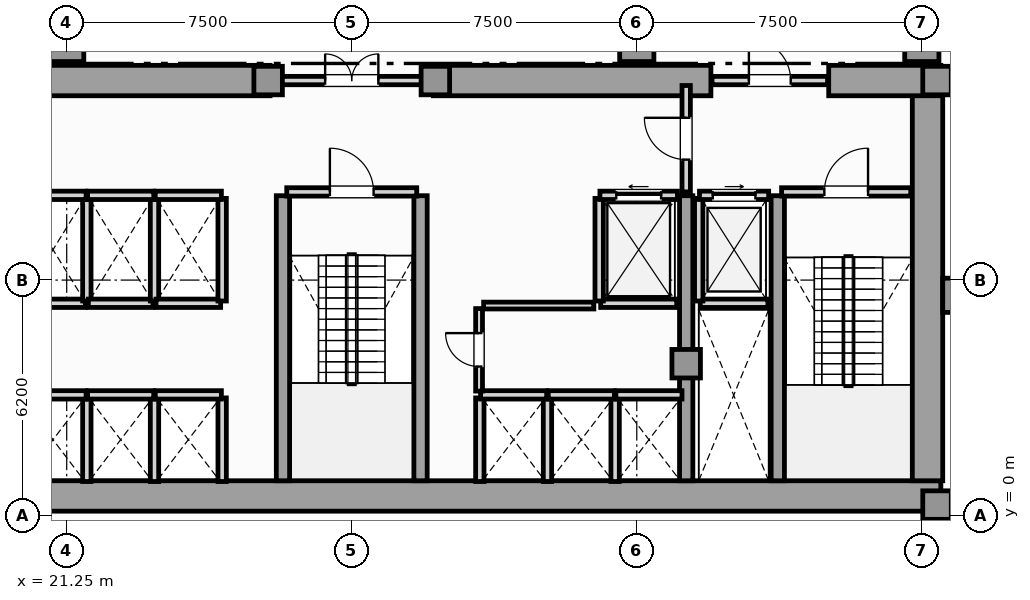
"""IFC4 building model, lengths in metres.
Left out: names, types, materials, properties, quantities, classifications, styles, units other than length and angle.
Written with IfcOpenShell. Run it as: python <this file> out.ifc"""

import sys

from ifc_helpers import new_model, si_unit, direction, frame, frame_2d, origin, origin_2d, place, context, subcontext, project, spatial, rectangle, extrude, element, fill, save


model = new_model("IFC4")
c1 = context("Model", 3, precision=1e-05, world=origin(), true_north=direction((0.0, 1.0)))
c2 = subcontext(c1, "Body", "Model", "MODEL_VIEW")
j1 = project(units=[si_unit("LENGTHUNIT", "METRE"), si_unit("PLANEANGLEUNIT", "RADIAN")], contexts=[c1])
p1 = place(None, origin())
s1 = spatial("IfcSite", under=j1, at=p1, CompositionType="ELEMENT")
p2 = place(p1, origin())
s2 = spatial("IfcBuilding", under=s1, at=p2, CompositionType="ELEMENT")
p3 = place(p2, frame((0.0, 0.0, 5.4)))
s3 = spatial("IfcBuildingStorey", under=s2, at=p3, CompositionType="ELEMENT", Elevation=5.4)
p4 = place(p3, frame((13.25, 0.52, 0.0), z_axis=(0.0, 0.0, 1.0), x_axis=(1.0, 0.0, 0.0)))
e1 = element("IfcWall", 1, at=p4, inside=s3, PredefinedType="SHEAR", context=c2, shape_type="SweptSolid", body=[
    extrude(rectangle(XDim=31.0, YDim=0.8, at=frame_2d((15.5, 0.0))), origin(), (0.0, 0.0, 1.0), 4.5),
])
p5 = place(p3, frame((43.9, 0.92, 0.0), z_axis=(0.0, 0.0, 1.0), x_axis=(0.0, 1.0, 0.0)))
e2 = element("IfcWall", 2, at=p5, inside=s3, PredefinedType="SHEAR", context=c2, shape_type="SweptSolid", body=[
    extrude(rectangle(XDim=10.53, YDim=0.8, at=frame_2d((5.265, 0.0))), origin(), (0.0, 0.0, 1.0), 4.5),
])
for number, where, z_axis, x_axis in (
    (3, (19.3, 11.45, 0.0), (0.0, 0.0, 1.0), (1.0, 0.0, 0.0)),
    (4, (30.9, 11.45, 0.0), (0.0, 0.0, 1.0), (1.0, 0.0, 0.0)),
):
    element("IfcWall", number, at=place(p3, frame(where, z_axis=z_axis, x_axis=x_axis)), inside=s3, PredefinedType="SHEAR", context=c2, shape_type="SweptSolid", body=[
        extrude(rectangle(XDim=7.3, YDim=0.8, at=frame_2d((3.65, 0.0))), origin(), (0.0, 0.0, 1.0), 4.5),
    ])
p6 = place(p3, frame((41.3, 11.45, 0.0), z_axis=(0.0, 0.0, 1.0), x_axis=(1.0, 0.0, 0.0)))
e5 = element("IfcWall", 5, at=p6, inside=s3, PredefinedType="SHEAR", context=c2, shape_type="SweptSolid", body=[
    extrude(rectangle(XDim=2.95, YDim=0.8, at=frame_2d((1.475, 0.0))), origin(), (0.0, 0.0, 1.0), 4.5),
])
for number, where, z_axis, x_axis in (
    (6, (26.94, 0.92, 0.0), (0.0, 0.0, 1.0), (0.0, 1.0, 0.0)),
    (7, (30.56, 0.92, 0.0), (0.0, 0.0, 1.0), (0.0, 1.0, 0.0)),
    (8, (37.55, 0.92, 0.0), (0.0, 0.0, 1.0), (0.0, 1.0, 0.0)),
    (9, (39.96, 0.92, 0.0), (0.0, 0.0, 1.0), (0.0, 1.0, 0.0)),
):
    element("IfcWall", number, at=place(p3, frame(where, z_axis=z_axis, x_axis=x_axis)), inside=s3, PredefinedType="SHEAR", context=c2, shape_type="SweptSolid", body=[
        extrude(rectangle(XDim=7.5, YDim=0.35, at=frame_2d((3.75, 0.0))), origin(), (0.0, 0.0, 1.0), 4.5),
    ])
p7 = place(p3, frame((44.6, 5.8, 0.0), z_axis=(0.0, 0.0, 1.0), x_axis=(1.0, 0.0, 0.0)))
e10 = element("IfcColumn", 10, at=p7, inside=s3, PredefinedType="PILASTER", context=c2, shape_type="SweptSolid", body=[
    extrude(rectangle(XDim=0.6, YDim=0.9, at=origin_2d()), origin(), (0.0, 0.0, 1.0), 4.8),
])
for number, where, z_axis, x_axis in (
    (11, (44.15, 0.28, 0.0), (0.0, 0.0, 1.0), (1.0, 0.0, 0.0)),
    (12, (44.15, 11.45, 0.0), (0.0, 0.0, 1.0), (1.0, 0.0, 0.0)),
    (13, (37.55, 4.0, 0.0), (0.0, 0.0, 1.0), (1.0, 0.0, 0.0)),
    (14, (26.55, 11.45, 0.0), (0.0, 0.0, 1.0), (1.0, 0.0, 0.0)),
    (15, (30.95, 11.45, 0.0), (0.0, 0.0, 1.0), (1.0, 0.0, 0.0)),
):
    element("IfcColumn", number, at=place(p3, frame(where, z_axis=z_axis, x_axis=x_axis)), inside=s3, PredefinedType="COLUMN", context=c2, shape_type="SweptSolid", body=[
        extrude(rectangle(XDim=0.75, YDim=0.75, at=origin_2d()), origin(), (0.0, 0.0, 1.0), 4.8),
    ])
for number, where, z_axis, x_axis in (
    (16, (43.75, 12.4, 0.0), (0.0, 0.0, 1.0), (1.0, 0.0, 0.0)),
    (17, (21.25, 12.4, 0.0), (0.0, 0.0, 1.0), (1.0, 0.0, 0.0)),
    (18, (36.25, 12.4, 0.0), (0.0, 0.0, 1.0), (1.0, 0.0, 0.0)),
):
    element("IfcColumn", number, at=place(p3, frame(where, z_axis=z_axis, x_axis=x_axis)), inside=s3, PredefinedType="COLUMN", context=c2, shape_type="SweptSolid", body=[
        extrude(rectangle(XDim=0.9, YDim=0.9, at=origin_2d()), origin(), (0.0, 0.0, 1.0), 4.8),
    ])
p8 = place(p3, frame((37.92, 5.59, 0.0), z_axis=(0.0, 0.0, 1.0), x_axis=(1.0, 0.0, 0.0)))
e19 = element("IfcWall", 19, at=p8, inside=s3, PredefinedType="SOLIDWALL", context=c2, shape_type="SweptSolid", body=[
    extrude(rectangle(XDim=1.78, YDim=0.22, at=frame_2d((0.89, 0.0))), origin(), (0.0, 0.0, 1.0), 4.5),
])
p9 = place(p3, frame((37.88, 5.65, 0.0), z_axis=(0.0, 0.0, 1.0), x_axis=(0.0, 1.0, 0.0)))
e20 = element("IfcWall", 20, at=p9, inside=s3, PredefinedType="SOLIDWALL", context=c2, shape_type="SweptSolid", body=[
    extrude(rectangle(XDim=2.7, YDim=0.22, at=frame_2d((1.35, 0.0))), origin(), (0.0, 0.0, 1.0), 4.5),
])
p10 = place(p3, frame((37.9, 8.43, 0.0), z_axis=(0.0, 0.0, 1.0), x_axis=(1.0, 0.0, 0.0)))
e21 = element("IfcWall", 21, at=p10, inside=s3, PredefinedType="SOLIDWALL", context=c2, shape_type="SweptSolid", body=[
    extrude(rectangle(XDim=1.82, YDim=0.22, at=frame_2d((0.91, 0.0))), origin(), (0.0, 0.0, 1.0), 4.5),
])
p11 = place(p10, frame((0.35, 0.0, 0.0)))
e22 = element("IfcOpeningElement", 22, at=p11, cuts=e21, PredefinedType="OPENING", context=c2, shape_type="SweptSolid", body=[
    extrude(rectangle(XDim=1.12, YDim=2.25, at=frame_2d((0.56, 1.125))), frame((0.0, 0.12, 0.0), z_axis=(0.0, -1.0, 0.0), x_axis=(1.0, 0.0, 0.0)), (0.0, 0.0, 1.0), 0.24),
])
p12 = place(p3, frame((35.3, 5.59, 0.0), z_axis=(0.0, 0.0, 1.0), x_axis=(1.0, 0.0, 0.0)))
e23 = element("IfcWall", 23, at=p12, inside=s3, PredefinedType="SOLIDWALL", context=c2, shape_type="SweptSolid", body=[
    extrude(rectangle(XDim=2.0, YDim=0.22, at=frame_2d((1.0, 0.0))), origin(), (0.0, 0.0, 1.0), 4.5),
])
p13 = place(p3, frame((35.26, 5.65, 0.0), z_axis=(0.0, 0.0, 1.0), x_axis=(0.0, 1.0, 0.0)))
e24 = element("IfcWall", 24, at=p13, inside=s3, PredefinedType="SOLIDWALL", context=c2, shape_type="SweptSolid", body=[
    extrude(rectangle(XDim=2.7, YDim=0.22, at=frame_2d((1.35, 0.0))), origin(), (0.0, 0.0, 1.0), 4.5),
])
p14 = place(p3, frame((35.28, 8.43, 0.0), z_axis=(0.0, 0.0, 1.0), x_axis=(1.0, 0.0, 0.0)))
e25 = element("IfcWall", 25, at=p14, inside=s3, PredefinedType="SOLIDWALL", context=c2, shape_type="SweptSolid", body=[
    extrude(rectangle(XDim=2.04, YDim=0.22, at=frame_2d((1.02, 0.0))), origin(), (0.0, 0.0, 1.0), 4.5),
])
p15 = place(p14, frame((0.43, 0.0, 0.0)))
e26 = element("IfcOpeningElement", 26, at=p15, cuts=e25, PredefinedType="OPENING", context=c2, shape_type="SweptSolid", body=[
    extrude(rectangle(XDim=1.18, YDim=2.2, at=frame_2d((0.59, 1.1))), frame((0.0, 0.12, 0.0), z_axis=(0.0, -1.0, 0.0), x_axis=(1.0, 0.0, 0.0)), (0.0, 0.0, 1.0), 0.24),
])
p16 = place(p3, frame((21.78, 0.9, 0.0), z_axis=(0.0, 0.0, 1.0), x_axis=(0.0, 1.0, 0.0)))
e27 = element("IfcWall", 27, at=p16, inside=s3, PredefinedType="SOLIDWALL", context=c2, shape_type="SweptSolid", body=[
    extrude(rectangle(XDim=2.2, YDim=0.22, at=frame_2d((1.1, 0.0))), origin(), (0.0, 0.0, 1.0), 4.5),
])
p17 = place(p3, frame((20.02, 3.18, 0.0), z_axis=(0.0, 0.0, 1.0), x_axis=(1.0, 0.0, 0.0)))
e28 = element("IfcWall", 28, at=p17, inside=s3, PredefinedType="SOLIDWALL", context=c2, shape_type="SweptSolid", body=[
    extrude(rectangle(XDim=1.74, YDim=0.22, at=frame_2d((0.87, 0.0))), origin(), (0.0, 0.0, 1.0), 4.5),
])
p18 = place(p3, frame((23.56, 0.9, 0.0), z_axis=(0.0, 0.0, 1.0), x_axis=(0.0, 1.0, 0.0)))
e29 = element("IfcWall", 29, at=p18, inside=s3, PredefinedType="SOLIDWALL", context=c2, shape_type="SweptSolid", body=[
    extrude(rectangle(XDim=2.2, YDim=0.22, at=frame_2d((1.1, 0.0))), origin(), (0.0, 0.0, 1.0), 4.5),
])
p19 = place(p3, frame((21.8, 3.18, 0.0), z_axis=(0.0, 0.0, 1.0), x_axis=(1.0, 0.0, 0.0)))
e30 = element("IfcWall", 30, at=p19, inside=s3, PredefinedType="SOLIDWALL", context=c2, shape_type="SweptSolid", body=[
    extrude(rectangle(XDim=1.74, YDim=0.22, at=frame_2d((0.87, 0.0))), origin(), (0.0, 0.0, 1.0), 4.5),
])
p20 = place(p3, frame((25.34, 0.9, 0.0), z_axis=(0.0, 0.0, 1.0), x_axis=(0.0, 1.0, 0.0)))
e31 = element("IfcWall", 31, at=p20, inside=s3, PredefinedType="SOLIDWALL", context=c2, shape_type="SweptSolid", body=[
    extrude(rectangle(XDim=2.2, YDim=0.22, at=frame_2d((1.1, 0.0))), origin(), (0.0, 0.0, 1.0), 4.5),
])
p21 = place(p3, frame((23.58, 3.18, 0.0), z_axis=(0.0, 0.0, 1.0), x_axis=(1.0, 0.0, 0.0)))
e32 = element("IfcWall", 32, at=p21, inside=s3, PredefinedType="SOLIDWALL", context=c2, shape_type="SweptSolid", body=[
    extrude(rectangle(XDim=1.74, YDim=0.22, at=frame_2d((0.87, 0.0))), origin(), (0.0, 0.0, 1.0), 4.5),
])
for number, where, z_axis, x_axis in (
    (33, (32.12, 0.9, 0.0), (0.0, 0.0, 1.0), (0.0, 1.0, 0.0)),
    (34, (33.9, 0.9, 0.0), (0.0, 0.0, 1.0), (0.0, 1.0, 0.0)),
):
    element("IfcWall", number, at=place(p3, frame(where, z_axis=z_axis, x_axis=x_axis)), inside=s3, PredefinedType="SOLIDWALL", context=c2, shape_type="SweptSolid", body=[
        extrude(rectangle(XDim=2.2, YDim=0.22, at=frame_2d((1.1, 0.0))), origin(), (0.0, 0.0, 1.0), 4.5),
    ])
p22 = place(p3, frame((32.14, 3.18, 0.0), z_axis=(0.0, 0.0, 1.0), x_axis=(1.0, 0.0, 0.0)))
e35 = element("IfcWall", 35, at=p22, inside=s3, PredefinedType="SOLIDWALL", context=c2, shape_type="SweptSolid", body=[
    extrude(rectangle(XDim=1.74, YDim=0.22, at=frame_2d((0.87, 0.0))), origin(), (0.0, 0.0, 1.0), 4.5),
])
p23 = place(p3, frame((35.68, 0.9, 0.0), z_axis=(0.0, 0.0, 1.0), x_axis=(0.0, 1.0, 0.0)))
e36 = element("IfcWall", 36, at=p23, inside=s3, PredefinedType="SOLIDWALL", context=c2, shape_type="SweptSolid", body=[
    extrude(rectangle(XDim=2.2, YDim=0.22, at=frame_2d((1.1, 0.0))), origin(), (0.0, 0.0, 1.0), 4.5),
])
for number, where, z_axis, x_axis in (
    (37, (33.92, 3.18, 0.0), (0.0, 0.0, 1.0), (1.0, 0.0, 0.0)),
    (38, (35.7, 3.18, 0.0), (0.0, 0.0, 1.0), (1.0, 0.0, 0.0)),
):
    element("IfcWall", number, at=place(p3, frame(where, z_axis=z_axis, x_axis=x_axis)), inside=s3, PredefinedType="SOLIDWALL", context=c2, shape_type="SweptSolid", body=[
        extrude(rectangle(XDim=1.74, YDim=0.22, at=frame_2d((0.87, 0.0))), origin(), (0.0, 0.0, 1.0), 4.5),
    ])
p24 = place(p3, frame((20.04, 5.59, 0.0), z_axis=(0.0, 0.0, 1.0), x_axis=(1.0, 0.0, 0.0)))
e39 = element("IfcWall", 39, at=p24, inside=s3, PredefinedType="SOLIDWALL", context=c2, shape_type="SweptSolid", body=[
    extrude(rectangle(XDim=1.7, YDim=0.22, at=frame_2d((0.85, 0.0))), origin(), (0.0, 0.0, 1.0), 4.5),
])
p25 = place(p3, frame((21.78, 5.65, 0.0), z_axis=(0.0, 0.0, 1.0), x_axis=(0.0, 1.0, 0.0)))
e40 = element("IfcWall", 40, at=p25, inside=s3, PredefinedType="SOLIDWALL", context=c2, shape_type="SweptSolid", body=[
    extrude(rectangle(XDim=2.7, YDim=0.22, at=frame_2d((1.35, 0.0))), origin(), (0.0, 0.0, 1.0), 4.5),
])
p26 = place(p3, frame((20.02, 8.43, 0.0), z_axis=(0.0, 0.0, 1.0), x_axis=(1.0, 0.0, 0.0)))
e41 = element("IfcWall", 41, at=p26, inside=s3, PredefinedType="SOLIDWALL", context=c2, shape_type="SweptSolid", body=[
    extrude(rectangle(XDim=1.74, YDim=0.22, at=frame_2d((0.87, 0.0))), origin(), (0.0, 0.0, 1.0), 4.5),
])
p27 = place(p3, frame((21.82, 5.59, 0.0), z_axis=(0.0, 0.0, 1.0), x_axis=(1.0, 0.0, 0.0)))
e42 = element("IfcWall", 42, at=p27, inside=s3, PredefinedType="SOLIDWALL", context=c2, shape_type="SweptSolid", body=[
    extrude(rectangle(XDim=1.7, YDim=0.22, at=frame_2d((0.85, 0.0))), origin(), (0.0, 0.0, 1.0), 4.5),
])
p28 = place(p3, frame((23.56, 5.65, 0.0), z_axis=(0.0, 0.0, 1.0), x_axis=(0.0, 1.0, 0.0)))
e43 = element("IfcWall", 43, at=p28, inside=s3, PredefinedType="SOLIDWALL", context=c2, shape_type="SweptSolid", body=[
    extrude(rectangle(XDim=2.7, YDim=0.22, at=frame_2d((1.35, 0.0))), origin(), (0.0, 0.0, 1.0), 4.5),
])
p29 = place(p3, frame((21.8, 8.43, 0.0), z_axis=(0.0, 0.0, 1.0), x_axis=(1.0, 0.0, 0.0)))
e44 = element("IfcWall", 44, at=p29, inside=s3, PredefinedType="SOLIDWALL", context=c2, shape_type="SweptSolid", body=[
    extrude(rectangle(XDim=1.74, YDim=0.22, at=frame_2d((0.87, 0.0))), origin(), (0.0, 0.0, 1.0), 4.5),
])
p30 = place(p3, frame((23.6, 5.59, 0.0), z_axis=(0.0, 0.0, 1.0), x_axis=(1.0, 0.0, 0.0)))
e45 = element("IfcWall", 45, at=p30, inside=s3, PredefinedType="SOLIDWALL", context=c2, shape_type="SweptSolid", body=[
    extrude(rectangle(XDim=1.7, YDim=0.22, at=frame_2d((0.85, 0.0))), origin(), (0.0, 0.0, 1.0), 4.5),
])
p31 = place(p3, frame((25.34, 5.65, 0.0), z_axis=(0.0, 0.0, 1.0), x_axis=(0.0, 1.0, 0.0)))
e46 = element("IfcWall", 46, at=p31, inside=s3, PredefinedType="SOLIDWALL", context=c2, shape_type="SweptSolid", body=[
    extrude(rectangle(XDim=2.7, YDim=0.22, at=frame_2d((1.35, 0.0))), origin(), (0.0, 0.0, 1.0), 4.5),
])
p32 = place(p3, frame((23.58, 8.43, 0.0), z_axis=(0.0, 0.0, 1.0), x_axis=(1.0, 0.0, 0.0)))
e47 = element("IfcWall", 47, at=p32, inside=s3, PredefinedType="SOLIDWALL", context=c2, shape_type="SweptSolid", body=[
    extrude(rectangle(XDim=1.74, YDim=0.22, at=frame_2d((0.87, 0.0))), origin(), (0.0, 0.0, 1.0), 4.5),
])
p33 = place(p3, frame((40.06, 8.52, 0.0), z_axis=(0.0, 0.0, 1.0), x_axis=(1.0, 0.0, 0.0)))
e48 = element("IfcWall", 48, at=p33, inside=s3, PredefinedType="SOLIDWALL", context=c2, shape_type="SweptSolid", body=[
    extrude(rectangle(XDim=3.4, YDim=0.22, at=frame_2d((1.7, 0.0))), origin(), (0.0, 0.0, 1.0), 4.5),
])
p34 = place(p33, frame((1.125, 0.0, 0.0)))
e49 = element("IfcOpeningElement", 49, at=p34, cuts=e48, PredefinedType="OPENING", context=c2, shape_type="SweptSolid", body=[
    extrude(rectangle(XDim=1.15, YDim=2.2, at=frame_2d((0.575, 1.1))), frame((0.0, 0.12, 0.0), z_axis=(0.0, -1.0, 0.0), x_axis=(1.0, 0.0, 0.0)), (0.0, 0.0, 1.0), 0.24),
])
p35 = place(p3, frame((27.04, 8.52, 0.0), z_axis=(0.0, 0.0, 1.0), x_axis=(1.0, 0.0, 0.0)))
e50 = element("IfcWall", 50, at=p35, inside=s3, PredefinedType="SOLIDWALL", context=c2, shape_type="SweptSolid", body=[
    extrude(rectangle(XDim=3.42, YDim=0.22, at=frame_2d((1.71, 0.0))), origin(), (0.0, 0.0, 1.0), 4.5),
])
p36 = place(p35, frame((1.135, 0.0, 0.0)))
e51 = element("IfcOpeningElement", 51, at=p36, cuts=e50, PredefinedType="OPENING", context=c2, shape_type="SweptSolid", body=[
    extrude(rectangle(XDim=1.15, YDim=2.2, at=frame_2d((0.575, 1.1))), frame((0.0, 0.12, 0.0), z_axis=(0.0, -1.0, 0.0), x_axis=(1.0, 0.0, 0.0)), (0.0, 0.0, 1.0), 0.24),
])
p37 = place(p3, frame((37.55, 8.52, 0.0), z_axis=(0.0, 0.0, 1.0), x_axis=(0.0, 1.0, 0.0)))
e52 = element("IfcWall", 52, at=p37, inside=s3, PredefinedType="SOLIDWALL", context=c2, shape_type="SweptSolid", body=[
    extrude(rectangle(XDim=2.8, YDim=0.22, at=frame_2d((1.4, 0.0))), origin(), (0.0, 0.0, 1.0), 3.956),
])
p38 = place(p37, frame((0.85, 0.0, 0.0)))
e53 = element("IfcOpeningElement", 53, at=p38, cuts=e52, PredefinedType="OPENING", context=c2, shape_type="SweptSolid", body=[
    extrude(rectangle(XDim=1.1, YDim=2.2, at=frame_2d((0.55, 1.1))), frame((0.0, 0.12, 0.0), z_axis=(0.0, -1.0, 0.0), x_axis=(1.0, 0.0, 0.0)), (0.0, 0.0, 1.0), 0.24),
])
p39 = place(p3, frame((26.63, 11.45, 0.0), z_axis=(0.0, 0.0, 1.0), x_axis=(1.0, 0.0, 0.0)))
e54 = element("IfcWall", 54, at=p39, inside=s3, PredefinedType="SOLIDWALL", context=c2, shape_type="SweptSolid", body=[
    extrude(rectangle(XDim=4.24, YDim=0.22, at=frame_2d((2.12, 0.0))), origin(), (0.0, 0.0, 1.0), 4.5),
])
p40 = place(p39, frame((1.42, 0.0, 0.0)))
e55 = element("IfcOpeningElement", 55, at=p40, cuts=e54, PredefinedType="OPENING", context=c2, shape_type="SweptSolid", body=[
    extrude(rectangle(XDim=1.4, YDim=2.2, at=frame_2d((0.7, 1.1))), frame((0.0, 0.12, 0.0), z_axis=(0.0, -1.0, 0.0), x_axis=(1.0, 0.0, 0.0)), (0.0, 0.0, 1.0), 0.24),
])
p41 = place(p3, frame((38.23, 11.45, 0.0), z_axis=(0.0, 0.0, 1.0), x_axis=(1.0, 0.0, 0.0)))
e56 = element("IfcWall", 56, at=p41, inside=s3, PredefinedType="SOLIDWALL", context=c2, shape_type="SweptSolid", body=[
    extrude(rectangle(XDim=3.04, YDim=0.22, at=frame_2d((1.52, 0.0))), origin(), (0.0, 0.0, 1.0), 4.5),
])
p42 = place(p41, frame((0.97, 0.0, 0.0)))
e57 = element("IfcOpeningElement", 57, at=p42, cuts=e56, PredefinedType="OPENING", context=c2, shape_type="SweptSolid", body=[
    extrude(rectangle(XDim=1.1, YDim=2.2, at=frame_2d((0.55, 1.1))), frame((0.0, 0.12, 0.0), z_axis=(0.0, -1.0, 0.0), x_axis=(1.0, 0.0, 0.0)), (0.0, 0.0, 1.0), 0.24),
])
p43 = place(p3, frame((32.1, 3.28, 0.0), z_axis=(0.0, 0.0, 1.0), x_axis=(0.0, 1.0, 0.0)))
e58 = element("IfcWall", 58, at=p43, inside=s3, PredefinedType="PARTITIONING", context=c2, shape_type="SweptSolid", body=[
    extrude(rectangle(XDim=2.17, YDim=0.18, at=frame_2d((1.085, 0.0))), origin(), (0.0, 0.0, 1.0), 4.5),
])
p44 = place(p43, frame((0.645, 0.0, 0.0)))
e59 = element("IfcOpeningElement", 59, at=p44, cuts=e58, PredefinedType="OPENING", context=c2, shape_type="SweptSolid", body=[
    extrude(rectangle(XDim=0.88, YDim=2.05, at=frame_2d((0.44, 1.025))), frame((0.0, 0.1, 0.0), z_axis=(0.0, -1.0, 0.0), x_axis=(1.0, 0.0, 0.0)), (0.0, 0.0, 1.0), 0.2),
])
p45 = place(p3, frame((32.22, 5.53, 0.0), z_axis=(0.0, 0.0, 1.0), x_axis=(1.0, 0.0, 0.0)))
e60 = element("IfcWall", 60, at=p45, inside=s3, PredefinedType="PARTITIONING", context=c2, shape_type="SweptSolid", body=[
    extrude(rectangle(XDim=2.9, YDim=0.18, at=frame_2d((1.45, 0.0))), origin(), (0.0, 0.0, 1.0), 4.5),
])
p46 = place(p11, origin())
e61 = element("IfcDoor", 61, at=p46, inside=s3, OperationType="SLIDING_TO_RIGHT", PredefinedType="DOOR", context=c2, shape_type="SweptSolid", body=[
    extrude(rectangle(XDim=1.12, YDim=2.25, at=frame_2d((0.56, 1.125))), frame((0.0, 0.025, 0.0), z_axis=(0.0, -1.0, 0.0), x_axis=(1.0, 0.0, 0.0)), (0.0, 0.0, 1.0), 0.05),
])
fill(e22, e61)
p47 = place(p15, origin())
e62 = element("IfcDoor", 62, at=p47, inside=s3, OperationType="SLIDING_TO_LEFT", PredefinedType="DOOR", context=c2, shape_type="SweptSolid", body=[
    extrude(rectangle(XDim=1.18, YDim=2.2, at=frame_2d((0.59, 1.1))), frame((0.0, 0.025, 0.0), z_axis=(0.0, -1.0, 0.0), x_axis=(1.0, 0.0, 0.0)), (0.0, 0.0, 1.0), 0.05),
])
fill(e26, e62)
p48 = place(p34, origin())
e63 = element("IfcDoor", 63, at=p48, inside=s3, OperationType="SINGLE_SWING_RIGHT", PredefinedType="DOOR", context=c2, shape_type="SweptSolid", body=[
    extrude(rectangle(XDim=1.15, YDim=2.2, at=frame_2d((0.575, 1.1))), frame((0.0, 0.025, 0.0), z_axis=(0.0, -1.0, 0.0), x_axis=(1.0, 0.0, 0.0)), (0.0, 0.0, 1.0), 0.05),
])
fill(e49, e63)
p49 = place(p36, origin())
e64 = element("IfcDoor", 64, at=p49, inside=s3, OperationType="SINGLE_SWING_LEFT", PredefinedType="DOOR", context=c2, shape_type="SweptSolid", body=[
    extrude(rectangle(XDim=1.15, YDim=2.2, at=frame_2d((0.575, 1.1))), frame((0.0, 0.025, 0.0), z_axis=(0.0, -1.0, 0.0), x_axis=(1.0, 0.0, 0.0)), (0.0, 0.0, 1.0), 0.05),
])
fill(e51, e64)
p50 = place(p38, origin())
e65 = element("IfcDoor", 65, at=p50, inside=s3, OperationType="SINGLE_SWING_RIGHT", PredefinedType="DOOR", context=c2, shape_type="SweptSolid", body=[
    extrude(rectangle(XDim=1.1, YDim=2.2, at=frame_2d((0.55, 1.1))), frame((0.0, 0.025, 0.0), z_axis=(0.0, -1.0, 0.0), x_axis=(1.0, 0.0, 0.0)), (0.0, 0.0, 1.0), 0.05),
])
fill(e53, e65)
p51 = place(p40, origin())
e66 = element("IfcDoor", 66, at=p51, inside=s3, OperationType="DOUBLE_DOOR_SINGLE_SWING", PredefinedType="DOOR", context=c2, shape_type="SweptSolid", body=[
    extrude(rectangle(XDim=1.4, YDim=2.2, at=frame_2d((0.7, 1.1))), frame((0.0, 0.025, 0.0), z_axis=(0.0, -1.0, 0.0), x_axis=(1.0, 0.0, 0.0)), (0.0, 0.0, 1.0), 0.05),
])
fill(e55, e66)
p52 = place(p42, origin())
e67 = element("IfcDoor", 67, at=p52, inside=s3, OperationType="SINGLE_SWING_LEFT", PredefinedType="DOOR", context=c2, shape_type="SweptSolid", body=[
    extrude(rectangle(XDim=1.1, YDim=2.2, at=frame_2d((0.55, 1.1))), frame((0.0, 0.025, 0.0), z_axis=(0.0, -1.0, 0.0), x_axis=(1.0, 0.0, 0.0)), (0.0, 0.0, 1.0), 0.05),
])
fill(e57, e67)
p53 = place(p44, origin())
e68 = element("IfcDoor", 68, at=p53, inside=s3, OperationType="SINGLE_SWING_RIGHT", PredefinedType="DOOR", context=c2, shape_type="SweptSolid", body=[
    extrude(rectangle(XDim=0.88, YDim=2.05, at=frame_2d((0.44, 1.025))), frame((0.0, 0.025, 0.0), z_axis=(0.0, -1.0, 0.0), x_axis=(1.0, 0.0, 0.0)), (0.0, 0.0, 1.0), 0.05),
])
fill(e59, e68)
save(model, sys.argv[1])
